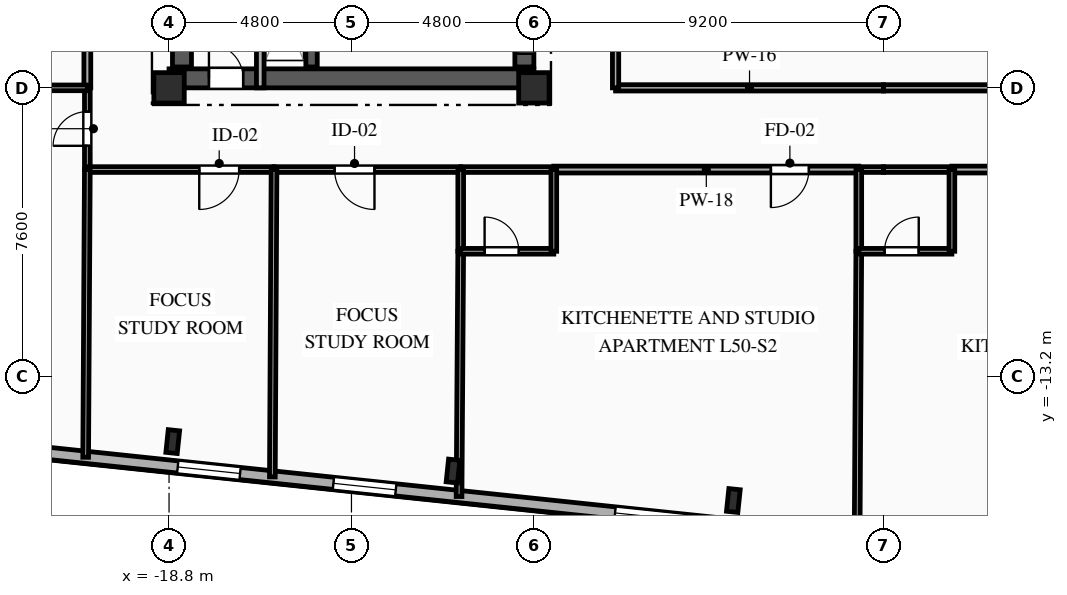
"""IFC4 building model, lengths in metres.
Left out: names, types, materials, properties, quantities, classifications, styles, units other than length and angle.
Written with IfcOpenShell. Run it as: python <this file> out.ifc"""

import sys

from ifc_helpers import new_model, si_unit, direction, frame, frame_2d, origin, origin_2d, place, context, subcontext, project, spatial, rectangle, i_section, extrude, element, fill, save


model = new_model("IFC4")
c1 = context("Model", 3, precision=1e-05, world=origin(), true_north=direction((0.0, 1.0)))
c2 = subcontext(c1, "Body", "Model", "MODEL_VIEW")
j1 = project(units=[si_unit("LENGTHUNIT", "METRE"), si_unit("PLANEANGLEUNIT", "RADIAN")], contexts=[c1])
p1 = place(None, origin())
s1 = spatial("IfcSite", under=j1, at=p1, CompositionType="ELEMENT")
p2 = place(p1, origin())
s2 = spatial("IfcBuilding", under=s1, at=p2, CompositionType="ELEMENT")
p3 = place(p2, frame((0.0, 0.0, 179.65)))
s3 = spatial("IfcBuildingStorey", under=s2, at=p3, CompositionType="ELEMENT", Elevation=179.65)
for number, where, z_axis, x_axis in (
    (1, (-18.8, -5.6, 0.0), (0.0, 0.0, 1.0), (1.0, 0.0, 0.0)),
    (2, (-9.2, -5.6, 0.0), (0.0, 0.0, 1.0), (1.0, 0.0, 0.0)),
):
    element("IfcColumn", number, at=place(p3, frame(where, z_axis=z_axis, x_axis=x_axis)), inside=s3, PredefinedType="COLUMN", context=c2, shape_type="SweptSolid", body=[
        extrude(rectangle(XDim=0.8, YDim=0.8, at=origin_2d()), origin(), (0.0, 0.0, 1.0), 3.35),
    ])
for number, where, z_axis, x_axis in (
    (3, (-18.703, -14.908, 0.0), (0.0, 0.0, 1.0), (0.995, -0.105, 0.0)),
    (4, (-11.327, -15.683, 0.0), (0.0, 0.0, 1.0), (0.995, -0.105, 0.0)),
    (5, (-3.951, -16.458, 0.0), (0.0, 0.0, 1.0), (0.995, -0.105, 0.0)),
):
    element("IfcColumn", number, at=place(p3, frame(where, z_axis=z_axis, x_axis=x_axis)), inside=s3, PredefinedType="COLUMN", context=c2, shape_type="SweptSolid", body=[
        extrude(i_section(OverallWidth=0.3, OverallDepth=0.6, WebThickness=0.015, FlangeThickness=0.03, FilletRadius=0.027, at=origin_2d()), origin(), (0.0, 0.0, 1.0), 3.35),
    ])
p4 = place(p3, frame((18.756, -19.498, 0.0), z_axis=(0.0, 0.0, 1.0), x_axis=(-0.994522060044, 0.104526896475, 0.0)))
e6 = element("IfcWall", 6, at=p4, inside=s3, PredefinedType="SOLIDWALL", context=c2, shape_type="SweptSolid", body=[
    extrude(rectangle(XDim=45.8, YDim=0.32, at=frame_2d((22.9, 0.0))), origin(), (0.0, 0.0, 1.0), 3.04),
])
p5 = place(p4, frame((1.137, 0.0, 0.85)))
e7 = element("IfcOpeningElement", 7, at=p5, cuts=e6, PredefinedType="OPENING", context=c2, shape_type="SweptSolid", body=[
    extrude(rectangle(XDim=1.65, YDim=1.85, at=frame_2d((0.825, 0.925))), frame((0.0, 0.17, 0.0), z_axis=(0.0, -1.0, 0.0), x_axis=(1.0, 0.0, 0.0)), (0.0, 0.0, 1.0), 0.34),
])
p6 = place(p4, frame((5.42, 0.0, 0.85)))
e8 = element("IfcOpeningElement", 8, at=p6, cuts=e6, PredefinedType="OPENING", context=c2, shape_type="SweptSolid", body=[
    extrude(rectangle(XDim=1.65, YDim=1.85, at=frame_2d((0.825, 0.925))), frame((0.0, 0.17, 0.0), z_axis=(0.0, -1.0, 0.0), x_axis=(1.0, 0.0, 0.0)), (0.0, 0.0, 1.0), 0.34),
])
p7 = place(p4, frame((13.232, 0.0, 0.85)))
e9 = element("IfcOpeningElement", 9, at=p7, cuts=e6, PredefinedType="OPENING", context=c2, shape_type="SweptSolid", body=[
    extrude(rectangle(XDim=2.2, YDim=1.85, at=frame_2d((1.1, 0.925))), frame((0.0, 0.17, 0.0), z_axis=(0.0, -1.0, 0.0), x_axis=(1.0, 0.0, 0.0)), (0.0, 0.0, 1.0), 0.34),
])
p8 = place(p4, frame((23.762, 0.0, 0.85)))
e10 = element("IfcOpeningElement", 10, at=p8, cuts=e6, PredefinedType="OPENING", context=c2, shape_type="SweptSolid", body=[
    extrude(rectangle(XDim=2.2, YDim=1.85, at=frame_2d((1.1, 0.925))), frame((0.0, 0.17, 0.0), z_axis=(0.0, -1.0, 0.0), x_axis=(1.0, 0.0, 0.0)), (0.0, 0.0, 1.0), 0.34),
])
p9 = place(p4, frame((31.763, 0.0, 0.85)))
e11 = element("IfcOpeningElement", 11, at=p9, cuts=e6, PredefinedType="OPENING", context=c2, shape_type="SweptSolid", body=[
    extrude(rectangle(XDim=1.65, YDim=1.85, at=frame_2d((0.825, 0.925))), frame((0.0, 0.17, 0.0), z_axis=(0.0, -1.0, 0.0), x_axis=(1.0, 0.0, 0.0)), (0.0, 0.0, 1.0), 0.34),
])
p10 = place(p4, frame((35.883, 0.0, 0.85)))
e12 = element("IfcOpeningElement", 12, at=p10, cuts=e6, PredefinedType="OPENING", context=c2, shape_type="SweptSolid", body=[
    extrude(rectangle(XDim=1.65, YDim=1.85, at=frame_2d((0.825, 0.925))), frame((0.0, 0.17, 0.0), z_axis=(0.0, -1.0, 0.0), x_axis=(1.0, 0.0, 0.0)), (0.0, 0.0, 1.0), 0.34),
])
p11 = place(p4, frame((41.892, 0.0, 0.85)))
e13 = element("IfcOpeningElement", 13, at=p11, cuts=e6, PredefinedType="OPENING", context=c2, shape_type="SweptSolid", body=[
    extrude(rectangle(XDim=1.65, YDim=1.85, at=frame_2d((0.825, 0.925))), frame((0.0, 0.17, 0.0), z_axis=(0.0, -1.0, 0.0), x_axis=(1.0, 0.0, 0.0)), (0.0, 0.0, 1.0), 0.34),
])
p12 = place(p3, frame((-18.8, -5.35, 0.0), z_axis=(0.0, 0.0, 1.0), x_axis=(1.0, 0.0, 0.0)))
e14 = element("IfcWall", 14, at=p12, inside=s3, PredefinedType="SHEAR", context=c2, shape_type="SweptSolid", body=[
    extrude(rectangle(XDim=9.6, YDim=0.5, at=frame_2d((4.8, 0.0))), origin(), (0.0, 0.0, 1.0), 3.04),
])
p13 = place(p12, frame((1.05, 0.0, 0.0)))
e15 = element("IfcOpeningElement", 15, at=p13, cuts=e14, PredefinedType="OPENING", context=c2, shape_type="SweptSolid", body=[
    extrude(rectangle(XDim=0.9, YDim=2.1, at=frame_2d((0.45, 1.05))), frame((0.0, 0.26, 0.0), z_axis=(0.0, -1.0, 0.0), x_axis=(1.0, 0.0, 0.0)), (0.0, 0.0, 1.0), 0.52),
])
p14 = place(p3, frame((-18.46, -5.05, 0.0), z_axis=(0.0, 0.0, 1.0), x_axis=(0.0, 1.0, 0.0)))
e16 = element("IfcWall", 16, at=p14, inside=s3, PredefinedType="SHEAR", context=c2, shape_type="SweptSolid", body=[
    extrude(rectangle(XDim=10.1, YDim=0.5, at=frame_2d((5.05, 0.0))), origin(), (0.0, 0.0, 1.0), 3.04),
])
p15 = place(p3, frame((-9.45, -5.05, 0.0), z_axis=(0.0, 0.0, 1.0), x_axis=(0.0, 1.0, 0.0)))
e17 = element("IfcWall", 17, at=p15, inside=s3, PredefinedType="SHEAR", context=c2, shape_type="SweptSolid", body=[
    extrude(rectangle(XDim=10.1, YDim=0.5, at=frame_2d((5.05, 0.0))), origin(), (0.0, 0.0, 1.0), 3.04),
])
p16 = place(p15, frame((7.15, 0.0, 0.0)))
e18 = element("IfcOpeningElement", 18, at=p16, cuts=e17, PredefinedType="OPENING", context=c2, shape_type="SweptSolid", body=[
    extrude(rectangle(XDim=0.9, YDim=2.1, at=frame_2d((0.45, 1.05))), frame((0.0, 0.26, 0.0), z_axis=(0.0, -1.0, 0.0), x_axis=(1.0, 0.0, 0.0)), (0.0, 0.0, 1.0), 0.52),
])
p17 = place(p15, frame((2.4, 0.0, 0.0)))
e19 = element("IfcOpeningElement", 19, at=p17, cuts=e17, PredefinedType="OPENING", context=c2, shape_type="SweptSolid", body=[
    extrude(rectangle(XDim=1.2, YDim=2.15, at=frame_2d((0.6, 1.075))), frame((0.0, 0.26, 0.0), z_axis=(0.0, -1.0, 0.0), x_axis=(1.0, 0.0, 0.0)), (0.0, 0.0, 1.0), 0.52),
])
p18 = place(p15, frame((0.35, 0.0, 0.0)))
e20 = element("IfcOpeningElement", 20, at=p18, cuts=e17, PredefinedType="OPENING", context=c2, shape_type="SweptSolid", body=[
    extrude(rectangle(XDim=0.9, YDim=2.1, at=frame_2d((0.45, 1.05))), frame((0.0, 0.26, 0.0), z_axis=(0.0, -1.0, 0.0), x_axis=(1.0, 0.0, 0.0)), (0.0, 0.0, 1.0), 0.52),
])
p19 = place(p15, frame((5.0, 0.0, 0.0)))
e21 = element("IfcOpeningElement", 21, at=p19, cuts=e17, PredefinedType="OPENING", context=c2, shape_type="SweptSolid", body=[
    extrude(rectangle(XDim=0.9, YDim=2.1, at=frame_2d((0.45, 1.05))), frame((0.0, 0.26, 0.0), z_axis=(0.0, -1.0, 0.0), x_axis=(1.0, 0.0, 0.0)), (0.0, 0.0, 1.0), 0.52),
])
p20 = place(p3, frame((-15.05, -5.05, 0.0), z_axis=(0.0, 0.0, 1.0), x_axis=(0.0, 1.0, 0.0)))
e22 = element("IfcWall", 22, at=p20, inside=s3, PredefinedType="SHEAR", context=c2, shape_type="SweptSolid", body=[
    extrude(rectangle(XDim=10.1, YDim=0.3, at=frame_2d((5.05, 0.0))), origin(), (0.0, 0.0, 1.0), 3.04),
])
p21 = place(p3, frame((-16.4, -5.6, 0.0), z_axis=(0.0, 0.0, 1.0), x_axis=(0.0, 1.0, 0.0)))
e23 = element("IfcWall", 23, at=p21, inside=s3, PredefinedType="PARTITIONING", context=c2, shape_type="SweptSolid", body=[
    extrude(rectangle(XDim=3.49, YDim=0.2, at=frame_2d((1.745, 0.0))), origin(), (0.0, 0.0, 1.0), 3.04),
])
p22 = place(p3, frame((-20.95, -7.75, 0.0), z_axis=(0.0, 0.0, 1.0), x_axis=(0.0, 1.0, 0.0)))
e24 = element("IfcWall", 24, at=p22, inside=s3, PredefinedType="PARTITIONING", context=c2, shape_type="SweptSolid", body=[
    extrude(rectangle(XDim=2.15, YDim=0.15, at=frame_2d((1.075, 0.0))), origin(), (0.0, 0.0, 1.0), 3.04),
])
p23 = place(p22, frame((0.625, 0.0, 0.0)))
e25 = element("IfcOpeningElement", 25, at=p23, cuts=e24, PredefinedType="OPENING", context=c2, shape_type="SweptSolid", body=[
    extrude(rectangle(XDim=0.9, YDim=2.1, at=frame_2d((0.45, 1.05))), frame((0.0, 0.085, 0.0), z_axis=(0.0, -1.0, 0.0), x_axis=(1.0, 0.0, 0.0)), (0.0, 0.0, 1.0), 0.17),
])
p24 = place(p3, frame((-16.038, -7.75, 0.0), z_axis=(0.0, 0.0, 1.0), x_axis=(-1.0, 0.0, 0.0)))
e26 = element("IfcWall", 26, at=p24, inside=s3, PredefinedType="PARTITIONING", context=c2, shape_type="SweptSolid", body=[
    extrude(rectangle(XDim=4.912, YDim=0.15, at=frame_2d((2.456, 0.0))), origin(), (0.0, 0.0, 1.0), 3.04),
])
p25 = place(p24, frame((0.918, 0.0, 0.0)))
e27 = element("IfcOpeningElement", 27, at=p25, cuts=e26, PredefinedType="OPENING", context=c2, shape_type="SweptSolid", body=[
    extrude(rectangle(XDim=1.05, YDim=2.15, at=frame_2d((0.525, 1.075))), frame((0.0, 0.085, 0.0), z_axis=(0.0, -1.0, 0.0), x_axis=(1.0, 0.0, 0.0)), (0.0, 0.0, 1.0), 0.17),
])
p26 = place(p3, frame((-11.125, -7.75, 0.0), z_axis=(0.0, 0.0, 1.0), x_axis=(-1.0, 0.0, 0.0)))
e28 = element("IfcWall", 28, at=p26, inside=s3, PredefinedType="PARTITIONING", context=c2, shape_type="SweptSolid", body=[
    extrude(rectangle(XDim=4.913, YDim=0.15, at=frame_2d((2.456, 0.0))), origin(), (0.0, 0.0, 1.0), 3.04),
])
p27 = place(p26, frame((2.269, 0.0, 0.0)))
e29 = element("IfcOpeningElement", 29, at=p27, cuts=e28, PredefinedType="OPENING", context=c2, shape_type="SweptSolid", body=[
    extrude(rectangle(XDim=1.05, YDim=2.15, at=frame_2d((0.525, 1.075))), frame((0.0, 0.085, 0.0), z_axis=(0.0, -1.0, 0.0), x_axis=(1.0, 0.0, 0.0)), (0.0, 0.0, 1.0), 0.17),
])
p28 = place(p3, frame((-0.65, -7.75, 0.0), z_axis=(0.0, 0.0, 1.0), x_axis=(-1.0, 0.0, 0.0)))
e30 = element("IfcWall", 30, at=p28, inside=s3, PredefinedType="PARTITIONING", context=c2, shape_type="SweptSolid", body=[
    extrude(rectangle(XDim=8.025, YDim=0.18, at=frame_2d((4.013, 0.0))), origin(), (0.0, 0.0, 1.0), 3.04),
])
p29 = place(p28, frame((1.313, 0.0, 0.0)))
e31 = element("IfcOpeningElement", 31, at=p29, cuts=e30, PredefinedType="OPENING", context=c2, shape_type="SweptSolid", body=[
    extrude(rectangle(XDim=1.0, YDim=2.15, at=frame_2d((0.5, 1.075))), frame((0.0, 0.1, 0.0), z_axis=(0.0, -1.0, 0.0), x_axis=(1.0, 0.0, 0.0)), (0.0, 0.0, 1.0), 0.2),
])
p30 = place(p3, frame((-8.675, -7.75, 0.0), z_axis=(0.0, 0.0, 1.0), x_axis=(-1.0, 0.0, 0.0)))
e32 = element("IfcWall", 32, at=p30, inside=s3, PredefinedType="PLUMBINGWALL", context=c2, shape_type="SweptSolid", body=[
    extrude(rectangle(XDim=2.45, YDim=0.15, at=frame_2d((1.225, 0.0))), origin(), (0.0, 0.0, 1.0), 3.04),
])
p31 = place(p3, frame((0.0, -7.75, 0.0), z_axis=(0.0, 0.0, 1.0), x_axis=(-1.0, 0.0, 0.0)))
e33 = element("IfcWall", 33, at=p31, inside=s3, PredefinedType="PLUMBINGWALL", context=c2, shape_type="SweptSolid", body=[
    extrude(rectangle(XDim=0.65, YDim=0.15, at=frame_2d((0.325, 0.0))), origin(), (0.0, 0.0, 1.0), 3.04),
])
p32 = place(p3, frame((-7.05, -5.6, 0.0), z_axis=(0.0, 0.0, 1.0), x_axis=(1.0, 0.0, 0.0)))
e34 = element("IfcWall", 34, at=p32, inside=s3, PredefinedType="PARTITIONING", context=c2, shape_type="SweptSolid", body=[
    extrude(rectangle(XDim=7.05, YDim=0.165, at=frame_2d((3.525, 0.0))), origin(), (0.0, 0.0, 1.0), 2.525),
])
p33 = place(p3, frame((9.825, -7.75, 0.0), z_axis=(0.0, 0.0, 1.0), x_axis=(-1.0, 0.0, 0.0)))
e35 = element("IfcWall", 35, at=p33, inside=s3, PredefinedType="PARTITIONING", context=c2, shape_type="SweptSolid", body=[
    extrude(rectangle(XDim=8.025, YDim=0.18, at=frame_2d((4.012, 0.0))), origin(), (0.0, 0.0, 1.0), 3.04),
])
p34 = place(p33, frame((5.712, 0.0, 0.0)))
e36 = element("IfcOpeningElement", 36, at=p34, cuts=e35, PredefinedType="OPENING", context=c2, shape_type="SweptSolid", body=[
    extrude(rectangle(XDim=1.0, YDim=2.15, at=frame_2d((0.5, 1.075))), frame((0.0, 0.1, 0.0), z_axis=(0.0, -1.0, 0.0), x_axis=(1.0, 0.0, 0.0)), (0.0, 0.0, 1.0), 0.2),
])
p35 = place(p3, frame((1.8, -7.75, 0.0), z_axis=(0.0, 0.0, 1.0), x_axis=(-1.0, 0.0, 0.0)))
e37 = element("IfcWall", 37, at=p35, inside=s3, PredefinedType="PLUMBINGWALL", context=c2, shape_type="SweptSolid", body=[
    extrude(rectangle(XDim=1.8, YDim=0.15, at=frame_2d((0.9, 0.0))), origin(), (0.0, 0.0, 1.0), 3.04),
])
p36 = place(p3, frame((0.0, -5.6, 0.0), z_axis=(0.0, 0.0, 1.0), x_axis=(1.0, 0.0, 0.0)))
e38 = element("IfcWall", 38, at=p36, inside=s3, PredefinedType="PARTITIONING", context=c2, shape_type="SweptSolid", body=[
    extrude(rectangle(XDim=7.05, YDim=0.165, at=frame_2d((3.525, 0.0))), origin(), (0.0, 0.0, 1.0), 2.525),
])
p37 = place(p3, frame((-20.95, -5.6, 0.0), z_axis=(0.0, 0.0, 1.0), x_axis=(0.0, 1.0, 0.0)))
e39 = element("IfcWall", 39, at=p37, inside=s3, PredefinedType="PARTITIONING", context=c2, shape_type="SweptSolid", body=[
    extrude(rectangle(XDim=14.1, YDim=0.18, at=frame_2d((7.05, 0.0))), origin(), (0.0, 0.0, 1.0), 3.04),
])
p38 = place(p37, frame((5.058, 0.0, 0.0)))
e40 = element("IfcOpeningElement", 40, at=p38, cuts=e39, PredefinedType="OPENING", context=c2, shape_type="SweptSolid", body=[
    extrude(rectangle(XDim=1.0, YDim=2.15, at=frame_2d((0.5, 1.075))), frame((0.0, 0.1, 0.0), z_axis=(0.0, -1.0, 0.0), x_axis=(1.0, 0.0, 0.0)), (0.0, 0.0, 1.0), 0.2),
])
p39 = place(p3, frame((-7.05, -2.95, 0.0), z_axis=(0.0, 0.0, 1.0), x_axis=(0.0, -1.0, 0.0)))
e41 = element("IfcWall", 41, at=p39, inside=s3, PredefinedType="PARTITIONING", context=c2, shape_type="SweptSolid", body=[
    extrude(rectangle(XDim=2.65, YDim=0.165, at=frame_2d((1.325, 0.0))), origin(), (0.0, 0.0, 1.0), 3.04),
])
p40 = place(p3, frame((-20.95, -5.6, 0.0), z_axis=(0.0, 0.0, 1.0), x_axis=(-1.0, 0.0, 0.0)))
e42 = element("IfcWall", 42, at=p40, inside=s3, PredefinedType="PARTITIONING", context=c2, shape_type="SweptSolid", body=[
    extrude(rectangle(XDim=2.65, YDim=0.15, at=frame_2d((1.325, 0.0))), origin(), (0.0, 0.0, 1.0), 3.04),
])
p41 = place(p40, frame((0.965, 0.0, 0.0)))
e43 = element("IfcOpeningElement", 43, at=p41, cuts=e42, PredefinedType="OPENING", context=c2, shape_type="SweptSolid", body=[
    extrude(rectangle(XDim=1.05, YDim=2.15, at=frame_2d((0.525, 1.075))), frame((0.0, 0.085, 0.0), z_axis=(0.0, -1.0, 0.0), x_axis=(1.0, 0.0, 0.0)), (0.0, 0.0, 1.0), 0.17),
])
p42 = place(p3, frame((-20.95, -7.75, 0.0), z_axis=(0.0, 0.0, 1.0), x_axis=(-0.005804668564, -0.99998315277, 0.0)))
e44 = element("IfcWall", 44, at=p42, inside=s3, PredefinedType="PARTITIONING", context=c2, shape_type="SweptSolid", body=[
    extrude(rectangle(XDim=7.571, YDim=0.15, at=frame_2d((3.785, 0.0))), origin(), (0.0, 0.0, 1.0), 3.04),
])
p43 = place(p3, frame((-16.038, -7.75, 0.0), z_axis=(0.0, 0.0, 1.0), x_axis=(-0.00540385782, -0.999985399054, 0.0)))
e45 = element("IfcWall", 45, at=p43, inside=s3, PredefinedType="PARTITIONING", context=c2, shape_type="SweptSolid", body=[
    extrude(rectangle(XDim=8.087, YDim=0.15, at=frame_2d((4.043, 0.0))), origin(), (0.0, 0.0, 1.0), 3.04),
])
p44 = place(p3, frame((-11.125, -9.9, 0.0), z_axis=(0.0, 0.0, 1.0), x_axis=(-0.006809511849, -0.999976815005, 0.0)))
e46 = element("IfcWall", 46, at=p44, inside=s3, PredefinedType="PARTITIONING", context=c2, shape_type="SweptSolid", body=[
    extrude(rectangle(XDim=6.454, YDim=0.15, at=frame_2d((3.227, 0.0))), origin(), (0.0, 0.0, 1.0), 2.665),
])
p45 = place(p3, frame((-11.125, -7.75, 0.0), z_axis=(0.0, 0.0, 1.0), x_axis=(0.0, -1.0, 0.0)))
e47 = element("IfcWall", 47, at=p45, inside=s3, PredefinedType="PLUMBINGWALL", context=c2, shape_type="SweptSolid", body=[
    extrude(rectangle(XDim=2.15, YDim=0.15, at=frame_2d((1.075, 0.0))), origin(), (0.0, 0.0, 1.0), 3.04),
])
p46 = place(p3, frame((-11.125, -9.9, 0.0), z_axis=(0.0, 0.0, 1.0), x_axis=(1.0, 0.0, 0.0)))
e48 = element("IfcWall", 48, at=p46, inside=s3, PredefinedType="PLUMBINGWALL", context=c2, shape_type="SweptSolid", body=[
    extrude(rectangle(XDim=2.45, YDim=0.15, at=frame_2d((1.225, 0.0))), origin(), (0.0, 0.0, 1.0), 3.04),
])
p47 = place(p46, frame((0.629, 0.0, 0.0)))
e49 = element("IfcOpeningElement", 49, at=p47, cuts=e48, PredefinedType="OPENING", context=c2, shape_type="SweptSolid", body=[
    extrude(rectangle(XDim=0.9, YDim=2.1, at=frame_2d((0.45, 1.05))), frame((0.0, 0.085, 0.0), z_axis=(0.0, -1.0, 0.0), x_axis=(1.0, 0.0, 0.0)), (0.0, 0.0, 1.0), 0.17),
])
p48 = place(p3, frame((-8.675, -9.9, 0.0), z_axis=(0.0, 0.0, 1.0), x_axis=(0.0, 1.0, 0.0)))
e50 = element("IfcWall", 50, at=p48, inside=s3, PredefinedType="PLUMBINGWALL", context=c2, shape_type="SweptSolid", body=[
    extrude(rectangle(XDim=2.15, YDim=0.15, at=frame_2d((1.075, 0.0))), origin(), (0.0, 0.0, 1.0), 3.04),
])
p49 = place(p3, frame((-0.65, -9.9, 0.0), z_axis=(0.0, 0.0, 1.0), x_axis=(-0.005817237229, -0.999983079732, 0.0)))
e51 = element("IfcWall", 51, at=p49, inside=s3, PredefinedType="PARTITIONING", context=c2, shape_type="SweptSolid", body=[
    extrude(rectangle(XDim=7.554, YDim=0.15, at=frame_2d((3.777, 0.0))), origin(), (0.0, 0.0, 1.0), 3.04),
])
p50 = place(p3, frame((-0.65, -7.75, 0.0), z_axis=(0.0, 0.0, 1.0), x_axis=(0.0, -1.0, 0.0)))
e52 = element("IfcWall", 52, at=p50, inside=s3, PredefinedType="PLUMBINGWALL", context=c2, shape_type="SweptSolid", body=[
    extrude(rectangle(XDim=2.15, YDim=0.15, at=frame_2d((1.075, 0.0))), origin(), (0.0, 0.0, 1.0), 3.04),
])
p51 = place(p3, frame((-0.65, -9.9, 0.0), z_axis=(0.0, 0.0, 1.0), x_axis=(1.0, 0.0, 0.0)))
e53 = element("IfcWall", 53, at=p51, inside=s3, PredefinedType="PLUMBINGWALL", context=c2, shape_type="SweptSolid", body=[
    extrude(rectangle(XDim=2.45, YDim=0.15, at=frame_2d((1.225, 0.0))), origin(), (0.0, 0.0, 1.0), 3.04),
])
p52 = place(p51, frame((0.677, 0.0, 0.0)))
e54 = element("IfcOpeningElement", 54, at=p52, cuts=e53, PredefinedType="OPENING", context=c2, shape_type="SweptSolid", body=[
    extrude(rectangle(XDim=0.9, YDim=2.1, at=frame_2d((0.45, 1.05))), frame((0.0, 0.085, 0.0), z_axis=(0.0, -1.0, 0.0), x_axis=(1.0, 0.0, 0.0)), (0.0, 0.0, 1.0), 0.17),
])
p53 = place(p3, frame((1.8, -9.9, 0.0), z_axis=(0.0, 0.0, 1.0), x_axis=(0.0, 1.0, 0.0)))
e55 = element("IfcWall", 55, at=p53, inside=s3, PredefinedType="PLUMBINGWALL", context=c2, shape_type="SweptSolid", body=[
    extrude(rectangle(XDim=2.15, YDim=0.15, at=frame_2d((1.075, 0.0))), origin(), (0.0, 0.0, 1.0), 3.04),
])
p54 = place(p8, origin())
e56 = element("IfcWindow", 56, at=p54, inside=s3, PartitioningType="SINGLE_PANEL", PredefinedType="WINDOW", context=c2, shape_type="SweptSolid", body=[
    extrude(rectangle(XDim=2.2, YDim=1.85, at=frame_2d((1.1, 0.925))), frame((0.0, 0.03, 0.0), z_axis=(0.0, -1.0, 0.0), x_axis=(1.0, 0.0, 0.0)), (0.0, 0.0, 1.0), 0.06),
])
fill(e10, e56)
p55 = place(p9, origin())
e57 = element("IfcWindow", 57, at=p55, inside=s3, PartitioningType="SINGLE_PANEL", PredefinedType="WINDOW", context=c2, shape_type="SweptSolid", body=[
    extrude(rectangle(XDim=1.65, YDim=1.85, at=frame_2d((0.825, 0.925))), frame((0.0, 0.03, 0.0), z_axis=(0.0, -1.0, 0.0), x_axis=(1.0, 0.0, 0.0)), (0.0, 0.0, 1.0), 0.06),
])
fill(e11, e57)
p56 = place(p10, origin())
e58 = element("IfcWindow", 58, at=p56, inside=s3, PartitioningType="SINGLE_PANEL", PredefinedType="WINDOW", context=c2, shape_type="SweptSolid", body=[
    extrude(rectangle(XDim=1.65, YDim=1.85, at=frame_2d((0.825, 0.925))), frame((0.0, 0.03, 0.0), z_axis=(0.0, -1.0, 0.0), x_axis=(1.0, 0.0, 0.0)), (0.0, 0.0, 1.0), 0.06),
])
fill(e12, e58)
p57 = place(p13, origin())
e59 = element("IfcDoor", 59, at=p57, inside=s3, OperationType="SINGLE_SWING_LEFT", PredefinedType="DOOR", context=c2, shape_type="SweptSolid", body=[
    extrude(rectangle(XDim=0.9, YDim=2.1, at=frame_2d((0.45, 1.05))), frame((0.0, 0.025, 0.0), z_axis=(0.0, -1.0, 0.0), x_axis=(1.0, 0.0, 0.0)), (0.0, 0.0, 1.0), 0.05),
])
fill(e15, e59)
p58 = place(p18, origin())
e60 = element("IfcDoor", 60, at=p58, inside=s3, OperationType="SINGLE_SWING_RIGHT", PredefinedType="DOOR", context=c2, shape_type="SweptSolid", body=[
    extrude(rectangle(XDim=0.9, YDim=2.1, at=frame_2d((0.45, 1.05))), frame((0.0, 0.025, 0.0), z_axis=(0.0, -1.0, 0.0), x_axis=(1.0, 0.0, 0.0)), (0.0, 0.0, 1.0), 0.05),
])
fill(e20, e60)
p59 = place(p23, origin())
e61 = element("IfcDoor", 61, at=p59, inside=s3, OperationType="SINGLE_SWING_LEFT", PredefinedType="DOOR", context=c2, shape_type="SweptSolid", body=[
    extrude(rectangle(XDim=0.9, YDim=2.1, at=frame_2d((0.45, 1.05))), frame((0.0, 0.025, 0.0), z_axis=(0.0, -1.0, 0.0), x_axis=(1.0, 0.0, 0.0)), (0.0, 0.0, 1.0), 0.05),
])
fill(e25, e61)
p60 = place(p25, origin())
e62 = element("IfcDoor", 62, at=p60, inside=s3, OperationType="SINGLE_SWING_RIGHT", PredefinedType="DOOR", context=c2, shape_type="SweptSolid", body=[
    extrude(rectangle(XDim=1.05, YDim=2.15, at=frame_2d((0.525, 1.075))), frame((0.0, 0.025, 0.0), z_axis=(0.0, -1.0, 0.0), x_axis=(1.0, 0.0, 0.0)), (0.0, 0.0, 1.0), 0.05),
])
fill(e27, e62)
p61 = place(p27, origin())
e63 = element("IfcDoor", 63, at=p61, inside=s3, OperationType="SINGLE_SWING_LEFT", PredefinedType="DOOR", context=c2, shape_type="SweptSolid", body=[
    extrude(rectangle(XDim=1.05, YDim=2.15, at=frame_2d((0.525, 1.075))), frame((0.0, 0.025, 0.0), z_axis=(0.0, -1.0, 0.0), x_axis=(1.0, 0.0, 0.0)), (0.0, 0.0, 1.0), 0.05),
])
fill(e29, e63)
p62 = place(p29, origin())
e64 = element("IfcDoor", 64, at=p62, inside=s3, OperationType="SINGLE_SWING_RIGHT", PredefinedType="DOOR", context=c2, shape_type="SweptSolid", body=[
    extrude(rectangle(XDim=1.0, YDim=2.15, at=frame_2d((0.5, 1.075))), frame((0.0, 0.025, 0.0), z_axis=(0.0, -1.0, 0.0), x_axis=(1.0, 0.0, 0.0)), (0.0, 0.0, 1.0), 0.05),
])
fill(e31, e64)
p63 = place(p47, origin())
e65 = element("IfcDoor", 65, at=p63, inside=s3, OperationType="SINGLE_SWING_LEFT", PredefinedType="DOOR", context=c2, shape_type="SweptSolid", body=[
    extrude(rectangle(XDim=0.9, YDim=2.1, at=frame_2d((0.45, 1.05))), frame((0.0, 0.025, 0.0), z_axis=(0.0, -1.0, 0.0), x_axis=(1.0, 0.0, 0.0)), (0.0, 0.0, 1.0), 0.05),
])
fill(e49, e65)
p64 = place(p52, origin())
e66 = element("IfcDoor", 66, at=p64, inside=s3, OperationType="SINGLE_SWING_RIGHT", PredefinedType="DOOR", context=c2, shape_type="SweptSolid", body=[
    extrude(rectangle(XDim=0.9, YDim=2.1, at=frame_2d((0.45, 1.05))), frame((0.0, 0.025, 0.0), z_axis=(0.0, -1.0, 0.0), x_axis=(1.0, 0.0, 0.0)), (0.0, 0.0, 1.0), 0.05),
])
fill(e54, e66)
save(model, sys.argv[1])
